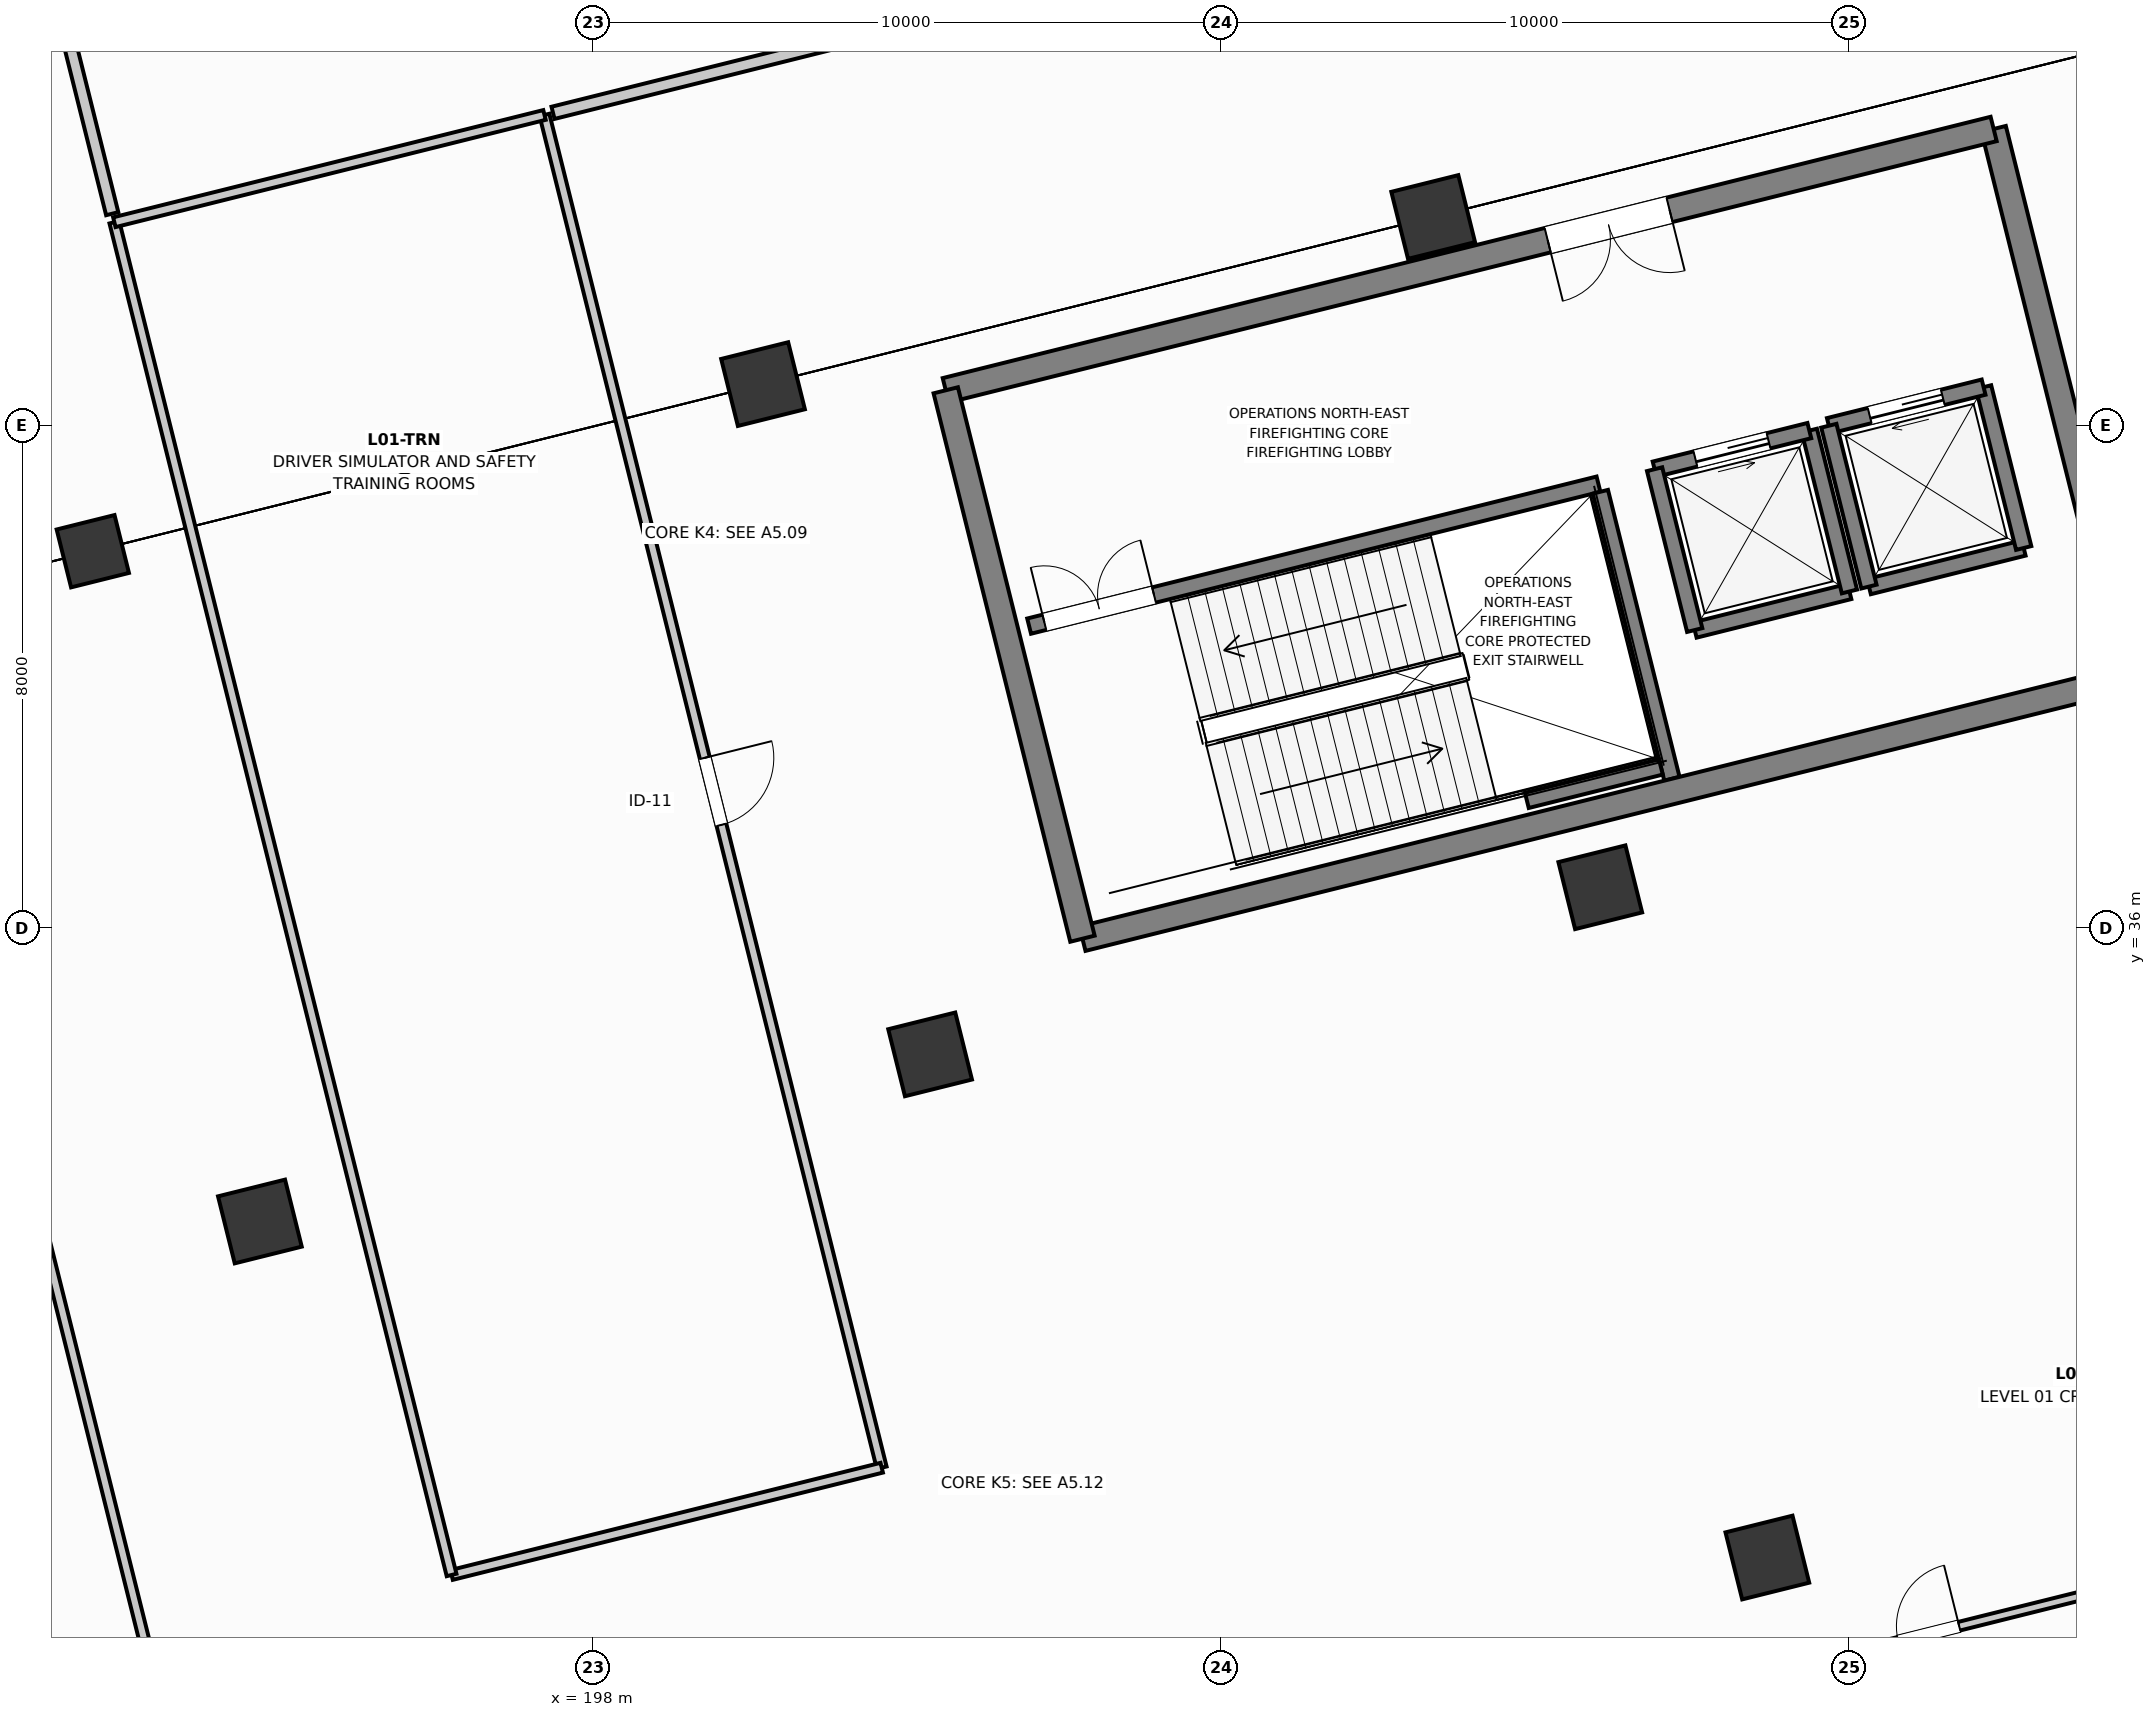
"""IFC4 building model, lengths in metres.
Left out: names, types, materials, properties, quantities, classifications, styles, units other than length and angle.
Written with IfcOpenShell. Run it as: python <this file> out.ifc"""

import sys

from ifc_helpers import new_model, si_unit, direction, frame, frame_2d, origin, origin_2d, place, context, subcontext, project, spatial, rectangle, extrude, element, fill, save


model = new_model("IFC4")
c1 = context("Model", 3, precision=1e-05, world=origin(), true_north=direction((0.0, 1.0)))
c2 = subcontext(c1, "Body", "Model", "MODEL_VIEW")
j1 = project(units=[si_unit("LENGTHUNIT", "METRE"), si_unit("PLANEANGLEUNIT", "RADIAN")], contexts=[c1])
p1 = place(None, origin())
s1 = spatial("IfcSite", under=j1, at=p1, CompositionType="ELEMENT")
p2 = place(p1, origin())
s2 = spatial("IfcBuilding", under=s1, at=p2, CompositionType="ELEMENT")
p3 = place(p2, frame((0.0, 0.0, 6.0)))
s3 = spatial("IfcBuildingStorey", under=s2, at=p3, CompositionType="ELEMENT", Elevation=6.0)
p4 = place(p3, frame((192.697, 31.33, 0.0), z_axis=(0.0, 0.0, 1.0), x_axis=(0.970295726276, 0.2419218956, 0.0)))
e1 = element("IfcColumn", 1, at=p4, inside=s3, PredefinedType="COLUMN", context=c2, shape_type="SweptSolid", body=[
    extrude(rectangle(XDim=1.1, YDim=1.1, at=origin_2d()), origin(), (0.0, 0.0, 1.0), 5.4),
])
p5 = place(p3, frame((190.036, 42.003, 0.0), z_axis=(0.0, 0.0, 1.0), x_axis=(0.970295726276, 0.2419218956, 0.0)))
e2 = element("IfcColumn", 2, at=p5, inside=s3, PredefinedType="COLUMN", context=c2, shape_type="SweptSolid", body=[
    extrude(rectangle(XDim=0.95, YDim=0.95, at=origin_2d()), origin(), (0.0, 0.0, 1.0), 5.4),
])
for number, where, z_axis, x_axis in (
    (3, (203.371, 33.991, 0.0), (0.0, 0.0, 1.0), (0.97, 0.242, 0.0)),
    (4, (200.71, 44.664, 0.0), (0.0, 0.0, 1.0), (0.97, 0.242, 0.0)),
    (5, (216.705, 25.979, 0.0), (0.0, 0.0, 1.0), (0.97, 0.242, 0.0)),
    (6, (214.044, 36.652, 0.0), (0.0, 0.0, 1.0), (0.97, 0.242, 0.0)),
    (7, (211.383, 47.325, 0.0), (0.0, 0.0, 1.0), (0.97, 0.242, 0.0)),
):
    element("IfcColumn", number, at=place(p3, frame(where, z_axis=z_axis, x_axis=x_axis)), inside=s3, PredefinedType="COLUMN", context=c2, shape_type="SweptSolid", body=[
        extrude(rectangle(XDim=1.1, YDim=1.1, at=origin_2d()), origin(), (0.0, 0.0, 1.0), 5.4),
    ])
p6 = place(p3, frame((222.056, 49.987, 0.0), z_axis=(0.0, 0.0, 1.0), x_axis=(0.970295726276, 0.2419218956, 0.0)))
e8 = element("IfcColumn", 8, at=p6, inside=s3, PredefinedType="COLUMN", context=c2, shape_type="SweptSolid", body=[
    extrude(rectangle(XDim=0.7, YDim=1.4, at=origin_2d()), origin(), (0.0, 0.0, 1.0), 5.4),
])
p7 = place(p3, frame((215.548, 40.748, 0.0), z_axis=(0.0, 0.0, 1.0), x_axis=(0.97029284861, 0.241933436994, 0.0)))
e9 = element("IfcWall", 9, at=p7, inside=s3, PredefinedType="SOLIDWALL", context=c2, shape_type="SweptSolid", body=[
    extrude(rectangle(XDim=2.54, YDim=0.25, at=frame_2d((1.27, 0.0))), origin(), (0.0, 0.0, 1.0), 5.05),
])
p8 = place(p3, frame((218.012, 41.362, 0.0), z_axis=(0.0, 0.0, 1.0), x_axis=(-0.241938414856, 0.970291607413, 0.0)))
e10 = element("IfcWall", 10, at=p8, inside=s3, PredefinedType="SOLIDWALL", context=c2, shape_type="SweptSolid", body=[
    extrude(rectangle(XDim=2.64, YDim=0.25, at=frame_2d((1.32, 0.0))), origin(), (0.0, 0.0, 1.0), 5.05),
])
p9 = place(p3, frame((217.374, 43.924, 0.0), z_axis=(0.0, 0.0, 1.0), x_axis=(-0.97029284861, -0.241933436994, 0.0)))
e11 = element("IfcWall", 11, at=p9, inside=s3, PredefinedType="SOLIDWALL", context=c2, shape_type="SweptSolid", body=[
    extrude(rectangle(XDim=2.54, YDim=0.25, at=frame_2d((1.27, 0.0))), origin(), (0.0, 0.0, 1.0), 5.05),
])
p10 = place(p9, frame((0.67, 0.0, 0.0)))
e12 = element("IfcOpeningElement", 12, at=p10, cuts=e11, PredefinedType="OPENING", context=c2, shape_type="SweptSolid", body=[
    extrude(rectangle(XDim=1.2, YDim=2.2, at=frame_2d((0.6, 1.1))), frame((0.0, 0.135, 0.0), z_axis=(0.0, -1.0, 0.0), x_axis=(1.0, 0.0, 0.0)), (0.0, 0.0, 1.0), 0.27),
])
p11 = place(p3, frame((214.909, 43.309, 0.0), z_axis=(0.0, 0.0, 1.0), x_axis=(0.241938414856, -0.970291607413, 0.0)))
e13 = element("IfcWall", 13, at=p11, inside=s3, PredefinedType="SOLIDWALL", context=c2, shape_type="SweptSolid", body=[
    extrude(rectangle(XDim=2.64, YDim=0.25, at=frame_2d((1.32, 0.0))), origin(), (0.0, 0.0, 1.0), 5.05),
])
p12 = place(p3, frame((218.323, 41.44, 0.0), z_axis=(0.0, 0.0, 1.0), x_axis=(0.97029284861, 0.241933436994, 0.0)))
e14 = element("IfcWall", 14, at=p12, inside=s3, PredefinedType="SOLIDWALL", context=c2, shape_type="SweptSolid", body=[
    extrude(rectangle(XDim=2.54, YDim=0.25, at=frame_2d((1.27, 0.0))), origin(), (0.0, 0.0, 1.0), 5.05),
])
p13 = place(p3, frame((220.787, 42.054, 0.0), z_axis=(0.0, 0.0, 1.0), x_axis=(-0.241938414856, 0.970291607413, 0.0)))
e15 = element("IfcWall", 15, at=p13, inside=s3, PredefinedType="SOLIDWALL", context=c2, shape_type="SweptSolid", body=[
    extrude(rectangle(XDim=2.64, YDim=0.25, at=frame_2d((1.32, 0.0))), origin(), (0.0, 0.0, 1.0), 5.05),
])
p14 = place(p3, frame((220.149, 44.616, 0.0), z_axis=(0.0, 0.0, 1.0), x_axis=(-0.97029284861, -0.241933436994, 0.0)))
e16 = element("IfcWall", 16, at=p14, inside=s3, PredefinedType="SOLIDWALL", context=c2, shape_type="SweptSolid", body=[
    extrude(rectangle(XDim=2.54, YDim=0.25, at=frame_2d((1.27, 0.0))), origin(), (0.0, 0.0, 1.0), 5.05),
])
p15 = place(p14, frame((0.67, 0.0, 0.0)))
e17 = element("IfcOpeningElement", 17, at=p15, cuts=e16, PredefinedType="OPENING", context=c2, shape_type="SweptSolid", body=[
    extrude(rectangle(XDim=1.2, YDim=2.2, at=frame_2d((0.6, 1.1))), frame((0.0, 0.135, 0.0), z_axis=(0.0, -1.0, 0.0), x_axis=(1.0, 0.0, 0.0)), (0.0, 0.0, 1.0), 0.27),
])
p16 = place(p3, frame((217.684, 44.001, 0.0), z_axis=(0.0, 0.0, 1.0), x_axis=(0.241938414856, -0.970291607413, 0.0)))
e18 = element("IfcWall", 18, at=p16, inside=s3, PredefinedType="SOLIDWALL", context=c2, shape_type="SweptSolid", body=[
    extrude(rectangle(XDim=2.64, YDim=0.25, at=frame_2d((1.32, 0.0))), origin(), (0.0, 0.0, 1.0), 5.05),
])
p17 = place(p3, frame((204.948, 40.81, 0.0), z_axis=(0.0, 0.0, 1.0), x_axis=(0.970297151331, 0.241916179943, 0.0)))
e19 = element("IfcWall", 19, at=p17, inside=s3, PredefinedType="SOLIDWALL", context=c2, shape_type="SweptSolid", body=[
    extrude(rectangle(XDim=9.345, YDim=0.25, at=frame_2d((4.673, 0.0))), origin(), (0.0, 0.0, 1.0), 5.03),
])
p18 = place(p17, frame((0.25, 0.0, 0.0)))
e20 = element("IfcOpeningElement", 20, at=p18, cuts=e19, PredefinedType="OPENING", context=c2, shape_type="SweptSolid", body=[
    extrude(rectangle(XDim=1.8, YDim=2.25, at=frame_2d((0.9, 1.125))), frame((0.0, 0.135, 0.0), z_axis=(0.0, -1.0, 0.0), x_axis=(1.0, 0.0, 0.0)), (0.0, 0.0, 1.0), 0.27),
])
p19 = place(p3, frame((215.185, 38.38, 0.0), z_axis=(0.0, 0.0, 1.0), x_axis=(-0.241911120435, 0.970298412763, 0.0)))
e21 = element("IfcWall", 21, at=p19, inside=s3, PredefinedType="SOLIDWALL", context=c2, shape_type="SweptSolid", body=[
    extrude(rectangle(XDim=4.71, YDim=0.25, at=frame_2d((2.355, 0.0))), origin(), (0.0, 0.0, 1.0), 5.03),
])
p20 = place(p3, frame((212.875, 38.035, 0.0), z_axis=(0.0, 0.0, 1.0), x_axis=(0.97029738597, 0.241915238833, 0.0)))
e22 = element("IfcWall", 22, at=p20, inside=s3, PredefinedType="SOLIDWALL", context=c2, shape_type="SweptSolid", body=[
    extrude(rectangle(XDim=2.2, YDim=0.25, at=frame_2d((1.1, 0.0))), origin(), (0.0, 0.0, 1.0), 5.03),
])
p21 = place(p3, frame((205.797, 35.833, 0.0), z_axis=(0.0, 0.0, 1.0), x_axis=(0.970295179998, 0.241924086589, 0.0)))
e23 = element("IfcWall", 23, at=p21, inside=s3, PredefinedType="SHEAR", context=c2, shape_type="SweptSolid", body=[
    extrude(rectangle(XDim=17.2, YDim=0.4, at=frame_2d((8.6, 0.0))), origin(), (0.0, 0.0, 1.0), 5.05),
])
p22 = place(p3, frame((222.486, 39.994, 0.0), z_axis=(0.0, 0.0, 1.0), x_axis=(-0.241923808098, 0.970295249435, 0.0)))
e24 = element("IfcWall", 24, at=p22, inside=s3, PredefinedType="SHEAR", context=c2, shape_type="SweptSolid", body=[
    extrude(rectangle(XDim=9.0, YDim=0.4, at=frame_2d((4.5, 0.0))), origin(), (0.0, 0.0, 1.0), 5.05),
])
p23 = place(p3, frame((220.309, 48.727, 0.0), z_axis=(0.0, 0.0, 1.0), x_axis=(-0.970296544738, -0.241918612906, 0.0)))
e25 = element("IfcWall", 25, at=p23, inside=s3, PredefinedType="SHEAR", context=c2, shape_type="SweptSolid", body=[
    extrude(rectangle(XDim=17.2, YDim=0.4, at=frame_2d((8.6, 0.0))), origin(), (0.0, 0.0, 1.0), 5.05),
])
p24 = place(p23, frame((5.32, 0.0, 0.0)))
e26 = element("IfcOpeningElement", 26, at=p24, cuts=e25, PredefinedType="OPENING", context=c2, shape_type="SweptSolid", body=[
    extrude(rectangle(XDim=2.0, YDim=2.3, at=frame_2d((1.0, 1.15))), frame((0.0, 0.21, 0.0), z_axis=(0.0, -1.0, 0.0), x_axis=(1.0, 0.0, 0.0)), (0.0, 0.0, 1.0), 0.42),
])
p25 = place(p3, frame((203.62, 44.566, 0.0), z_axis=(0.0, 0.0, 1.0), x_axis=(0.241921199913, -0.97029589973, 0.0)))
e27 = element("IfcWall", 27, at=p25, inside=s3, PredefinedType="SHEAR", context=c2, shape_type="SweptSolid", body=[
    extrude(rectangle(XDim=9.0, YDim=0.4, at=frame_2d((4.5, 0.0))), origin(), (0.0, 0.0, 1.0), 5.05),
])
p26 = place(p3, frame((211.319, 22.781, 0.0), z_axis=(0.0, 0.0, 1.0), x_axis=(0.970296178232, 0.241920082897, 0.0)))
e28 = element("IfcWall", 28, at=p26, inside=s3, PredefinedType="PARTITIONING", context=c2, shape_type="SweptSolid", body=[
    extrude(rectangle(XDim=16.4, YDim=0.14, at=frame_2d((8.2, 0.0))), origin(), (0.0, 0.0, 1.0), 3.975),
])
p27 = place(p26, frame((7.7, 0.0, 0.0)))
e29 = element("IfcOpeningElement", 29, at=p27, cuts=e28, PredefinedType="OPENING", context=c2, shape_type="SweptSolid", body=[
    extrude(rectangle(XDim=1.0, YDim=2.15, at=frame_2d((0.5, 1.075))), frame((0.0, 0.08, 0.0), z_axis=(0.0, -1.0, 0.0), x_axis=(1.0, 0.0, 0.0)), (0.0, 0.0, 1.0), 0.16),
])
p28 = place(p3, frame((185.528, 46.032, 0.0), z_axis=(0.0, 0.0, 1.0), x_axis=(0.241924022604, -0.970295195952, 0.0)))
e30 = element("IfcWall", 30, at=p28, inside=s3, PredefinedType="PARTITIONING", context=c2, shape_type="SweptSolid", body=[
    extrude(rectangle(XDim=22.2, YDim=0.16, at=frame_2d((11.1, 0.0))), origin(), (0.0, 0.0, 1.0), 4.425),
])
p29 = place(p3, frame((197.23, 48.95, 0.0), z_axis=(0.0, 0.0, 1.0), x_axis=(0.241924022604, -0.970295195952, 0.0)))
e31 = element("IfcWall", 31, at=p29, inside=s3, PredefinedType="PARTITIONING", context=c2, shape_type="SweptSolid", body=[
    extrude(rectangle(XDim=22.2, YDim=0.16, at=frame_2d((11.1, 0.0))), origin(), (0.0, 0.0, 1.0), 3.775),
])
p30 = place(p29, frame((10.55, 0.0, 0.0)))
e32 = element("IfcOpeningElement", 32, at=p30, cuts=e31, PredefinedType="OPENING", context=c2, shape_type="SweptSolid", body=[
    extrude(rectangle(XDim=1.1, YDim=2.2, at=frame_2d((0.55, 1.1))), frame((0.0, 0.09, 0.0), z_axis=(0.0, -1.0, 0.0), x_axis=(1.0, 0.0, 0.0)), (0.0, 0.0, 1.0), 0.18),
])
p31 = place(p3, frame((202.6, 27.409, 0.0), z_axis=(0.0, 0.0, 1.0), x_axis=(-0.970294782603, -0.241925680435, 0.0)))
e33 = element("IfcWall", 33, at=p31, inside=s3, PredefinedType="PARTITIONING", context=c2, shape_type="SweptSolid", body=[
    extrude(rectangle(XDim=7.06, YDim=0.16, at=frame_2d((3.53, 0.0))), origin(), (0.0, 0.0, 1.0), 5.03),
])
p32 = place(p3, frame((195.75, 25.701, 0.0), z_axis=(0.0, 0.0, 1.0), x_axis=(-0.241924022604, 0.970295195952, 0.0)))
e34 = element("IfcWall", 34, at=p32, inside=s3, PredefinedType="PARTITIONING", context=c2, shape_type="SweptSolid", body=[
    extrude(rectangle(XDim=22.2, YDim=0.16, at=frame_2d((11.1, 0.0))), origin(), (0.0, 0.0, 1.0), 3.775),
])
p33 = place(p3, frame((190.379, 47.242, 0.0), z_axis=(0.0, 0.0, 1.0), x_axis=(0.970294782603, 0.241925680435, 0.0)))
e35 = element("IfcWall", 35, at=p33, inside=s3, PredefinedType="PARTITIONING", context=c2, shape_type="SweptSolid", body=[
    extrude(rectangle(XDim=7.06, YDim=0.16, at=frame_2d((3.53, 0.0))), origin(), (0.0, 0.0, 1.0), 5.04),
])
p34 = place(p3, frame((190.345, 47.377, 0.0), z_axis=(0.0, 0.0, 1.0), x_axis=(-0.241921879243, 0.970295730354, 0.0)))
e36 = element("IfcWall", 36, at=p34, inside=s3, PredefinedType="PARTITIONING", context=c2, shape_type="SweptSolid", body=[
    extrude(rectangle(XDim=27.26, YDim=0.2, at=frame_2d((13.63, 0.0))), origin(), (0.0, 0.0, 1.0), 3.785),
])
p35 = place(p34, frame((3.924, 0.0, 0.0)))
e37 = element("IfcOpeningElement", 37, at=p35, cuts=e36, PredefinedType="OPENING", context=c2, shape_type="SweptSolid", body=[
    extrude(rectangle(XDim=1.1, YDim=2.2, at=frame_2d((0.55, 1.1))), frame((0.0, 0.11, 0.0), z_axis=(0.0, -1.0, 0.0), x_axis=(1.0, 0.0, 0.0)), (0.0, 0.0, 1.0), 0.22),
])
p36 = place(p3, frame((220.264, 54.693, 0.0), z_axis=(0.0, 0.0, 1.0), x_axis=(-0.970295347685, -0.241923414039, 0.0)))
e38 = element("IfcWall", 38, at=p36, inside=s3, PredefinedType="PARTITIONING", context=c2, shape_type="SweptSolid", body=[
    extrude(rectangle(XDim=23.6, YDim=0.2, at=frame_2d((11.8, 0.0))), origin(), (0.0, 0.0, 1.0), 3.835),
])
p37 = place(p10, origin())
e39 = element("IfcDoor", 39, at=p37, inside=s3, OperationType="SLIDING_TO_LEFT", PredefinedType="DOOR", context=c2, shape_type="SweptSolid", body=[
    extrude(rectangle(XDim=1.2, YDim=2.2, at=frame_2d((0.6, 1.1))), frame((0.0, 0.025, 0.0), z_axis=(0.0, -1.0, 0.0), x_axis=(1.0, 0.0, 0.0)), (0.0, 0.0, 1.0), 0.05),
])
fill(e12, e39)
p38 = place(p15, origin())
e40 = element("IfcDoor", 40, at=p38, inside=s3, OperationType="SLIDING_TO_RIGHT", PredefinedType="DOOR", context=c2, shape_type="SweptSolid", body=[
    extrude(rectangle(XDim=1.2, YDim=2.2, at=frame_2d((0.6, 1.1))), frame((0.0, 0.025, 0.0), z_axis=(0.0, -1.0, 0.0), x_axis=(1.0, 0.0, 0.0)), (0.0, 0.0, 1.0), 0.05),
])
fill(e17, e40)
p39 = place(p18, origin())
e41 = element("IfcDoor", 41, at=p39, inside=s3, OperationType="DOUBLE_DOOR_SINGLE_SWING", PredefinedType="DOOR", context=c2, shape_type="SweptSolid", body=[
    extrude(rectangle(XDim=1.8, YDim=2.25, at=frame_2d((0.9, 1.125))), frame((0.0, 0.025, 0.0), z_axis=(0.0, -1.0, 0.0), x_axis=(1.0, 0.0, 0.0)), (0.0, 0.0, 1.0), 0.05),
])
fill(e20, e41)
p40 = place(p24, origin())
e42 = element("IfcDoor", 42, at=p40, inside=s3, OperationType="DOUBLE_DOOR_SINGLE_SWING", PredefinedType="DOOR", context=c2, shape_type="SweptSolid", body=[
    extrude(rectangle(XDim=2.0, YDim=2.3, at=frame_2d((1.0, 1.15))), frame((0.0, 0.025, 0.0), z_axis=(0.0, -1.0, 0.0), x_axis=(1.0, 0.0, 0.0)), (0.0, 0.0, 1.0), 0.05),
])
fill(e26, e42)
p41 = place(p27, origin())
e43 = element("IfcDoor", 43, at=p41, inside=s3, OperationType="SINGLE_SWING_RIGHT", PredefinedType="DOOR", context=c2, shape_type="SweptSolid", body=[
    extrude(rectangle(XDim=1.0, YDim=2.15, at=frame_2d((0.5, 1.075))), frame((0.0, 0.025, 0.0), z_axis=(0.0, -1.0, 0.0), x_axis=(1.0, 0.0, 0.0)), (0.0, 0.0, 1.0), 0.05),
])
fill(e29, e43)
p42 = place(p30, origin())
e44 = element("IfcDoor", 44, at=p42, inside=s3, OperationType="SINGLE_SWING_LEFT", PredefinedType="DOOR", context=c2, shape_type="SweptSolid", body=[
    extrude(rectangle(XDim=1.1, YDim=2.2, at=frame_2d((0.55, 1.1))), frame((0.0, 0.025, 0.0), z_axis=(0.0, -1.0, 0.0), x_axis=(1.0, 0.0, 0.0)), (0.0, 0.0, 1.0), 0.05),
])
fill(e32, e44)
save(model, sys.argv[1])
